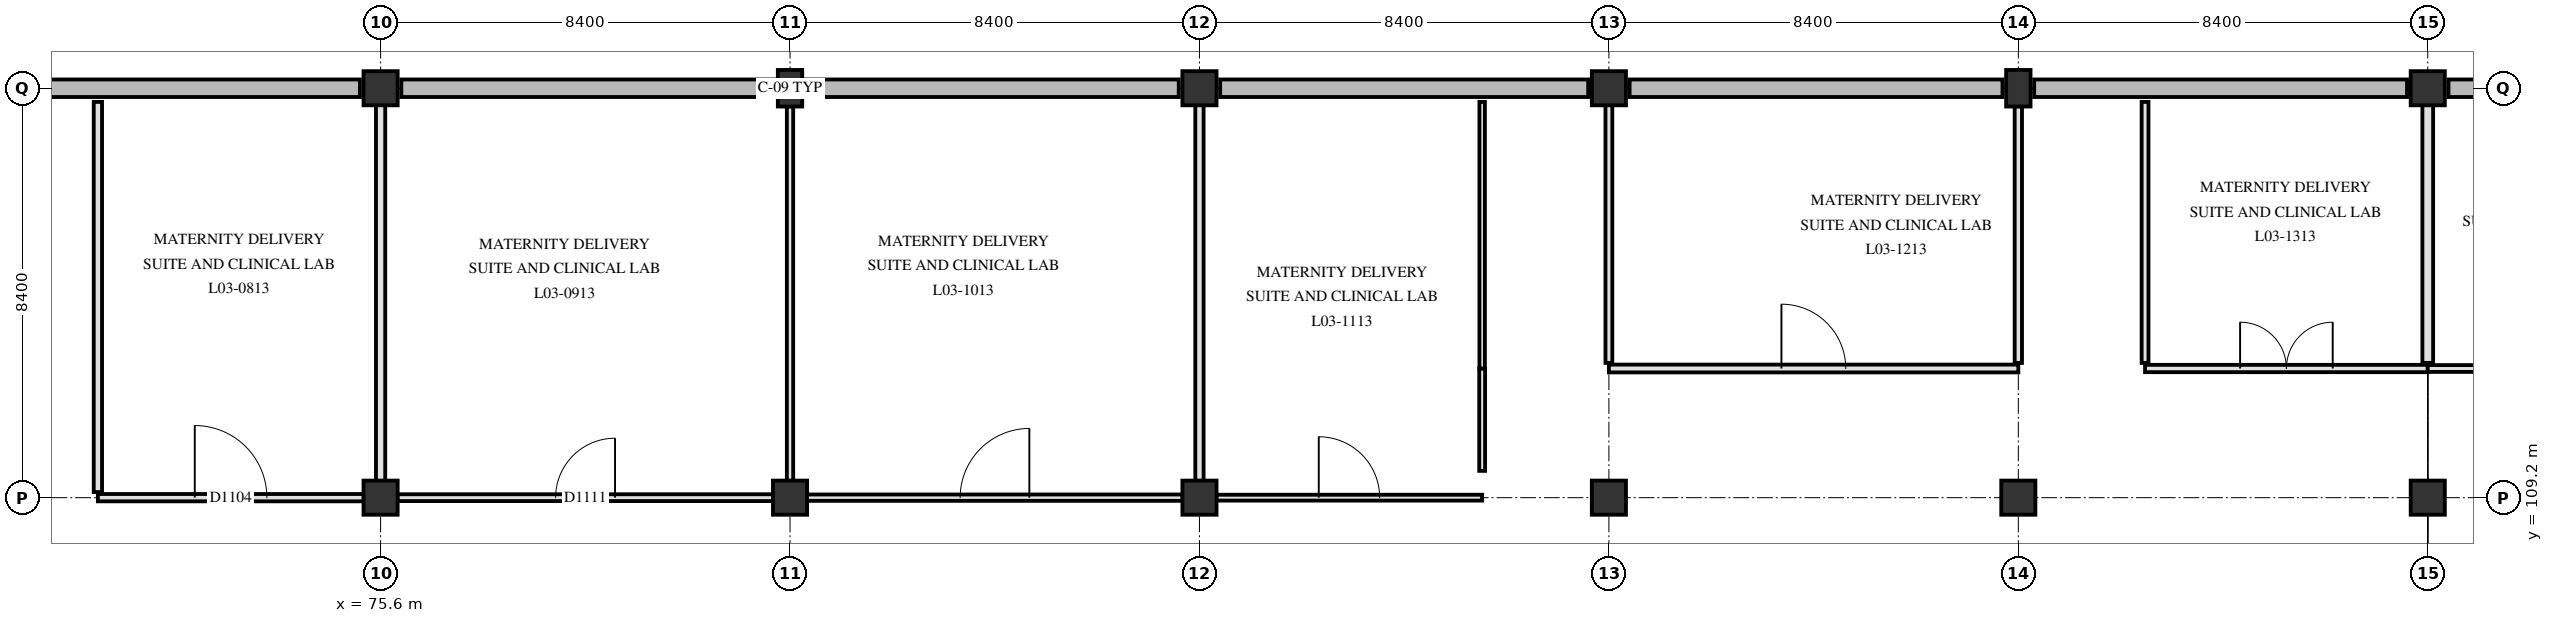
"""IFC4 building model, lengths in metres.
Left out: names, types, materials, properties, quantities, classifications, styles, units other than length and angle.
Written with IfcOpenShell. Run it as: python <this file> out.ifc"""

import sys

from ifc_helpers import new_model, si_unit, direction, frame, frame_2d, origin, origin_2d, place, context, subcontext, project, spatial, rectangle, extrude, element, fill, save


model = new_model("IFC4")
c1 = context("Model", 3, precision=1e-05, world=origin(), true_north=direction((0.0, 1.0)))
c2 = subcontext(c1, "Body", "Model", "MODEL_VIEW")
j1 = project(units=[si_unit("LENGTHUNIT", "METRE"), si_unit("PLANEANGLEUNIT", "RADIAN")], contexts=[c1])
p1 = place(None, origin())
s1 = spatial("IfcSite", under=j1, at=p1, CompositionType="ELEMENT")
p2 = place(p1, origin())
s2 = spatial("IfcBuilding", under=s1, at=p2, CompositionType="ELEMENT")
p3 = place(p2, frame((0.0, 0.0, 14.4)))
s3 = spatial("IfcBuildingStorey", under=s2, at=p3, CompositionType="ELEMENT", Elevation=14.4)
for number, where, z_axis, x_axis in (
    (1, (75.6, 109.2, 0.0), (0.0, 0.0, 1.0), (1.0, 0.0, 0.0)),
    (2, (75.6, 117.6, 0.0), (0.0, 0.0, 1.0), (1.0, 0.0, 0.0)),
    (3, (84.0, 109.2, 0.0), (0.0, 0.0, 1.0), (1.0, 0.0, 0.0)),
):
    element("IfcColumn", number, at=place(p3, frame(where, z_axis=z_axis, x_axis=x_axis)), inside=s3, PredefinedType="COLUMN", context=c2, shape_type="SweptSolid", body=[
        extrude(rectangle(XDim=0.7, YDim=0.7, at=origin_2d()), origin(), (0.0, 0.0, 1.0), 4.2),
    ])
p4 = place(p3, frame((84.0, 117.6, 0.0), z_axis=(0.0, 0.0, 1.0), x_axis=(1.0, 0.0, 0.0)))
e4 = element("IfcColumn", 4, at=p4, inside=s3, PredefinedType="PILASTER", context=c2, shape_type="SweptSolid", body=[
    extrude(rectangle(XDim=0.5, YDim=0.75, at=origin_2d()), origin(), (0.0, 0.0, 1.0), 4.2),
])
for number, where, z_axis, x_axis in (
    (5, (92.4, 109.2, 0.0), (0.0, 0.0, 1.0), (1.0, 0.0, 0.0)),
    (6, (92.4, 117.6, 0.0), (0.0, 0.0, 1.0), (1.0, 0.0, 0.0)),
    (7, (100.8, 109.2, 0.0), (0.0, 0.0, 1.0), (1.0, 0.0, 0.0)),
    (8, (100.8, 117.6, 0.0), (0.0, 0.0, 1.0), (1.0, 0.0, 0.0)),
    (9, (109.2, 109.2, 0.0), (0.0, 0.0, 1.0), (1.0, 0.0, 0.0)),
):
    element("IfcColumn", number, at=place(p3, frame(where, z_axis=z_axis, x_axis=x_axis)), inside=s3, PredefinedType="COLUMN", context=c2, shape_type="SweptSolid", body=[
        extrude(rectangle(XDim=0.7, YDim=0.7, at=origin_2d()), origin(), (0.0, 0.0, 1.0), 4.2),
    ])
p5 = place(p3, frame((109.2, 117.6, 0.0), z_axis=(0.0, 0.0, 1.0), x_axis=(1.0, 0.0, 0.0)))
e10 = element("IfcColumn", 10, at=p5, inside=s3, PredefinedType="PILASTER", context=c2, shape_type="SweptSolid", body=[
    extrude(rectangle(XDim=0.5, YDim=0.75, at=origin_2d()), origin(), (0.0, 0.0, 1.0), 4.2),
])
for number, where, z_axis, x_axis in (
    (11, (117.6, 109.2, 0.0), (0.0, 0.0, 1.0), (1.0, 0.0, 0.0)),
    (12, (117.6, 117.6, 0.0), (0.0, 0.0, 1.0), (1.0, 0.0, 0.0)),
):
    element("IfcColumn", number, at=place(p3, frame(where, z_axis=z_axis, x_axis=x_axis)), inside=s3, PredefinedType="COLUMN", context=c2, shape_type="SweptSolid", body=[
        extrude(rectangle(XDim=0.7, YDim=0.7, at=origin_2d()), origin(), (0.0, 0.0, 1.0), 4.2),
    ])
p6 = place(p3, frame((67.625, 117.6, 0.0), z_axis=(0.0, 0.0, 1.0), x_axis=(1.0, 0.0, 0.0)))
e13 = element("IfcWall", 13, at=p6, inside=s3, PredefinedType="SOLIDWALL", context=c2, shape_type="SweptSolid", body=[
    extrude(rectangle(XDim=7.55, YDim=0.36, at=frame_2d((3.775, 0.0))), origin(), (0.0, 0.0, 1.0), 3.9),
])
for number, where, z_axis, x_axis in (
    (14, (76.025, 117.6, 0.0), (0.0, 0.0, 1.0), (1.0, 0.0, 0.0)),
    (15, (84.325, 117.6, 0.0), (0.0, 0.0, 1.0), (1.0, 0.0, 0.0)),
):
    element("IfcWall", number, at=place(p3, frame(where, z_axis=z_axis, x_axis=x_axis)), inside=s3, PredefinedType="SOLIDWALL", context=c2, shape_type="SweptSolid", body=[
        extrude(rectangle(XDim=7.65, YDim=0.36, at=frame_2d((3.825, 0.0))), origin(), (0.0, 0.0, 1.0), 3.9),
    ])
p7 = place(p3, frame((92.825, 117.6, 0.0), z_axis=(0.0, 0.0, 1.0), x_axis=(1.0, 0.0, 0.0)))
e16 = element("IfcWall", 16, at=p7, inside=s3, PredefinedType="SOLIDWALL", context=c2, shape_type="SweptSolid", body=[
    extrude(rectangle(XDim=7.55, YDim=0.36, at=frame_2d((3.775, 0.0))), origin(), (0.0, 0.0, 1.0), 3.9),
])
p8 = place(p3, frame((101.225, 117.6, 0.0), z_axis=(0.0, 0.0, 1.0), x_axis=(1.0, 0.0, 0.0)))
e17 = element("IfcWall", 17, at=p8, inside=s3, PredefinedType="SOLIDWALL", context=c2, shape_type="SweptSolid", body=[
    extrude(rectangle(XDim=7.65, YDim=0.36, at=frame_2d((3.825, 0.0))), origin(), (0.0, 0.0, 1.0), 3.9),
])
p9 = place(p3, frame((109.525, 117.6, 0.0), z_axis=(0.0, 0.0, 1.0), x_axis=(1.0, 0.0, 0.0)))
e18 = element("IfcWall", 18, at=p9, inside=s3, PredefinedType="SOLIDWALL", context=c2, shape_type="SweptSolid", body=[
    extrude(rectangle(XDim=7.65, YDim=0.36, at=frame_2d((3.825, 0.0))), origin(), (0.0, 0.0, 1.0), 3.9),
])
p10 = place(p3, frame((118.025, 117.6, 0.0), z_axis=(0.0, 0.0, 1.0), x_axis=(1.0, 0.0, 0.0)))
e19 = element("IfcWall", 19, at=p10, inside=s3, PredefinedType="SOLIDWALL", context=c2, shape_type="SweptSolid", body=[
    extrude(rectangle(XDim=7.55, YDim=0.36, at=frame_2d((3.775, 0.0))), origin(), (0.0, 0.0, 1.0), 3.9),
])
p11 = place(p3, frame((69.8, 109.2, 0.0), z_axis=(0.0, 0.0, 1.0), x_axis=(1.0, 0.0, 0.0)))
e20 = element("IfcWall", 20, at=p11, inside=s3, PredefinedType="PARTITIONING", context=c2, shape_type="SweptSolid", body=[
    extrude(rectangle(XDim=5.455, YDim=0.15, at=frame_2d((2.728, 0.0))), origin(), (0.0, 0.0, 1.0), 3.29),
])
p12 = place(p11, frame((1.988, 0.0, 0.0)))
e21 = element("IfcOpeningElement", 21, at=p12, cuts=e20, PredefinedType="OPENING", context=c2, shape_type="SweptSolid", body=[
    extrude(rectangle(XDim=1.48, YDim=2.22, at=frame_2d((0.74, 1.11))), frame((0.0, 0.085, 0.0), z_axis=(0.0, -1.0, 0.0), x_axis=(1.0, 0.0, 0.0)), (0.0, 0.0, 1.0), 0.17),
])
p13 = place(p3, frame((75.945, 109.2, 0.0), z_axis=(0.0, 0.0, 1.0), x_axis=(1.0, 0.0, 0.0)))
e22 = element("IfcWall", 22, at=p13, inside=s3, PredefinedType="PARTITIONING", context=c2, shape_type="SweptSolid", body=[
    extrude(rectangle(XDim=7.71, YDim=0.14, at=frame_2d((3.855, 0.0))), origin(), (0.0, 0.0, 1.0), 3.29),
])
p14 = place(p13, frame((3.245, 0.0, 0.0)))
e23 = element("IfcOpeningElement", 23, at=p14, cuts=e22, PredefinedType="OPENING", context=c2, shape_type="SweptSolid", body=[
    extrude(rectangle(XDim=1.22, YDim=2.18, at=frame_2d((0.61, 1.09))), frame((0.0, 0.08, 0.0), z_axis=(0.0, -1.0, 0.0), x_axis=(1.0, 0.0, 0.0)), (0.0, 0.0, 1.0), 0.16),
])
p15 = place(p3, frame((84.345, 109.2, 0.0), z_axis=(0.0, 0.0, 1.0), x_axis=(1.0, 0.0, 0.0)))
e24 = element("IfcWall", 24, at=p15, inside=s3, PredefinedType="PARTITIONING", context=c2, shape_type="SweptSolid", body=[
    extrude(rectangle(XDim=7.71, YDim=0.13, at=frame_2d((3.855, 0.0))), origin(), (0.0, 0.0, 1.0), 3.29),
])
p16 = place(p15, frame((3.145, 0.0, 0.0)))
e25 = element("IfcOpeningElement", 25, at=p16, cuts=e24, PredefinedType="OPENING", context=c2, shape_type="SweptSolid", body=[
    extrude(rectangle(XDim=1.42, YDim=2.22, at=frame_2d((0.71, 1.11))), frame((0.0, 0.075, 0.0), z_axis=(0.0, -1.0, 0.0), x_axis=(1.0, 0.0, 0.0)), (0.0, 0.0, 1.0), 0.15),
])
p17 = place(p3, frame((92.745, 109.2, 0.0), z_axis=(0.0, 0.0, 1.0), x_axis=(1.0, 0.0, 0.0)))
e26 = element("IfcWall", 26, at=p17, inside=s3, PredefinedType="PARTITIONING", context=c2, shape_type="SweptSolid", body=[
    extrude(rectangle(XDim=5.455, YDim=0.12, at=frame_2d((2.728, 0.0))), origin(), (0.0, 0.0, 1.0), 3.29),
])
p18 = place(p17, frame((2.103, 0.0, 0.0)))
e27 = element("IfcOpeningElement", 27, at=p18, cuts=e26, PredefinedType="OPENING", context=c2, shape_type="SweptSolid", body=[
    extrude(rectangle(XDim=1.25, YDim=2.2, at=frame_2d((0.625, 1.1))), frame((0.0, 0.07, 0.0), z_axis=(0.0, -1.0, 0.0), x_axis=(1.0, 0.0, 0.0)), (0.0, 0.0, 1.0), 0.14),
])
p19 = place(p3, frame((100.8, 111.85, 0.0), z_axis=(0.0, 0.0, 1.0), x_axis=(1.0, 0.0, 0.0)))
e28 = element("IfcWall", 28, at=p19, inside=s3, PredefinedType="PARTITIONING", context=c2, shape_type="SweptSolid", body=[
    extrude(rectangle(XDim=8.4, YDim=0.16, at=frame_2d((4.2, 0.0))), origin(), (0.0, 0.0, 1.0), 2.69),
])
p20 = place(p19, frame((3.54, 0.0, 0.0)))
e29 = element("IfcOpeningElement", 29, at=p20, cuts=e28, PredefinedType="OPENING", context=c2, shape_type="SweptSolid", body=[
    extrude(rectangle(XDim=1.32, YDim=2.18, at=frame_2d((0.66, 1.09))), frame((0.0, 0.09, 0.0), z_axis=(0.0, -1.0, 0.0), x_axis=(1.0, 0.0, 0.0)), (0.0, 0.0, 1.0), 0.18),
])
p21 = place(p3, frame((111.8, 111.85, 0.0), z_axis=(0.0, 0.0, 1.0), x_axis=(1.0, 0.0, 0.0)))
e30 = element("IfcWall", 30, at=p21, inside=s3, PredefinedType="PARTITIONING", context=c2, shape_type="SweptSolid", body=[
    extrude(rectangle(XDim=5.8, YDim=0.15, at=frame_2d((2.9, 0.0))), origin(), (0.0, 0.0, 1.0), 3.34),
])
p22 = place(p21, frame((1.95, 0.0, 0.0)))
e31 = element("IfcOpeningElement", 31, at=p22, cuts=e30, PredefinedType="OPENING", context=c2, shape_type="SweptSolid", body=[
    extrude(rectangle(XDim=1.9, YDim=2.3, at=frame_2d((0.95, 1.15))), frame((0.0, 0.085, 0.0), z_axis=(0.0, -1.0, 0.0), x_axis=(1.0, 0.0, 0.0)), (0.0, 0.0, 1.0), 0.17),
])
p23 = place(p3, frame((117.6, 111.85, 0.0), z_axis=(0.0, 0.0, 1.0), x_axis=(1.0, 0.0, 0.0)))
e32 = element("IfcWall", 32, at=p23, inside=s3, PredefinedType="PARTITIONING", context=c2, shape_type="SweptSolid", body=[
    extrude(rectangle(XDim=8.4, YDim=0.14, at=frame_2d((4.2, 0.0))), origin(), (0.0, 0.0, 1.0), 2.69),
])
p24 = place(p23, frame((3.69, 0.0, 0.0)))
e33 = element("IfcOpeningElement", 33, at=p24, cuts=e32, PredefinedType="OPENING", context=c2, shape_type="SweptSolid", body=[
    extrude(rectangle(XDim=1.02, YDim=2.12, at=frame_2d((0.51, 1.06))), frame((0.0, 0.08, 0.0), z_axis=(0.0, -1.0, 0.0), x_axis=(1.0, 0.0, 0.0)), (0.0, 0.0, 1.0), 0.16),
])
p25 = place(p3, frame((69.8, 109.315, 0.0), z_axis=(0.0, 0.0, 1.0), x_axis=(0.0, 1.0, 0.0)))
e34 = element("IfcWall", 34, at=p25, inside=s3, PredefinedType="PARTITIONING", context=c2, shape_type="SweptSolid", body=[
    extrude(rectangle(XDim=8.005, YDim=0.17, at=frame_2d((4.002, 0.0))), origin(), (0.0, 0.0, 1.0), 2.89),
])
p26 = place(p3, frame((75.6, 109.545, 0.0), z_axis=(0.0, 0.0, 1.0), x_axis=(0.0, 1.0, 0.0)))
e35 = element("IfcWall", 35, at=p26, inside=s3, PredefinedType="PARTITIONING", context=c2, shape_type="SweptSolid", body=[
    extrude(rectangle(XDim=7.71, YDim=0.19, at=frame_2d((3.855, 0.0))), origin(), (0.0, 0.0, 1.0), 3.34),
])
p27 = place(p3, frame((84.0, 109.545, 0.0), z_axis=(0.0, 0.0, 1.0), x_axis=(0.0, 1.0, 0.0)))
e36 = element("IfcWall", 36, at=p27, inside=s3, PredefinedType="PARTITIONING", context=c2, shape_type="SweptSolid", body=[
    extrude(rectangle(XDim=7.685, YDim=0.13, at=frame_2d((3.843, 0.0))), origin(), (0.0, 0.0, 1.0), 3.34),
])
p28 = place(p3, frame((92.4, 109.545, 0.0), z_axis=(0.0, 0.0, 1.0), x_axis=(0.0, 1.0, 0.0)))
e37 = element("IfcWall", 37, at=p28, inside=s3, PredefinedType="PARTITIONING", context=c2, shape_type="SweptSolid", body=[
    extrude(rectangle(XDim=7.71, YDim=0.17, at=frame_2d((3.855, 0.0))), origin(), (0.0, 0.0, 1.0), 3.34),
])
p29 = place(p3, frame((98.2, 109.75, 0.0), z_axis=(0.0, 0.0, 1.0), x_axis=(0.0, 1.0, 0.0)))
e38 = element("IfcWall", 38, at=p29, inside=s3, PredefinedType="PARTITIONING", context=c2, shape_type="SweptSolid", body=[
    extrude(rectangle(XDim=2.1, YDim=0.12, at=frame_2d((1.05, 0.0))), origin(), (0.0, 0.0, 1.0), 3.89),
])
p30 = place(p3, frame((98.2, 111.85, 0.0), z_axis=(0.0, 0.0, 1.0), x_axis=(0.0, 1.0, 0.0)))
e39 = element("IfcWall", 39, at=p30, inside=s3, PredefinedType="PARTITIONING", context=c2, shape_type="SweptSolid", body=[
    extrude(rectangle(XDim=5.47, YDim=0.112, at=frame_2d((2.735, 0.0))), origin(), (0.0, 0.0, 1.0), 2.89),
])
p31 = place(p3, frame((100.8, 111.965, 0.0), z_axis=(0.0, 0.0, 1.0), x_axis=(0.0, 1.0, 0.0)))
e40 = element("IfcWall", 40, at=p31, inside=s3, PredefinedType="PARTITIONING", context=c2, shape_type="SweptSolid", body=[
    extrude(rectangle(XDim=5.29, YDim=0.14, at=frame_2d((2.645, 0.0))), origin(), (0.0, 0.0, 1.0), 2.69),
])
p32 = place(p3, frame((109.2, 111.965, 0.0), z_axis=(0.0, 0.0, 1.0), x_axis=(0.0, 1.0, 0.0)))
e41 = element("IfcWall", 41, at=p32, inside=s3, PredefinedType="PARTITIONING", context=c2, shape_type="SweptSolid", body=[
    extrude(rectangle(XDim=5.265, YDim=0.15, at=frame_2d((2.632, 0.0))), origin(), (0.0, 0.0, 1.0), 3.34),
])
p33 = place(p3, frame((111.8, 111.965, 0.0), z_axis=(0.0, 0.0, 1.0), x_axis=(0.0, 1.0, 0.0)))
e42 = element("IfcWall", 42, at=p33, inside=s3, PredefinedType="PARTITIONING", context=c2, shape_type="SweptSolid", body=[
    extrude(rectangle(XDim=5.355, YDim=0.14, at=frame_2d((2.677, 0.0))), origin(), (0.0, 0.0, 1.0), 2.89),
])
p34 = place(p3, frame((117.6, 111.965, 0.0), z_axis=(0.0, 0.0, 1.0), x_axis=(0.0, 1.0, 0.0)))
e43 = element("IfcWall", 43, at=p34, inside=s3, PredefinedType="PARTITIONING", context=c2, shape_type="SweptSolid", body=[
    extrude(rectangle(XDim=5.29, YDim=0.22, at=frame_2d((2.645, 0.0))), origin(), (0.0, 0.0, 1.0), 3.34),
])
p35 = place(p12, origin())
e44 = element("IfcDoor", 44, at=p35, inside=s3, OperationType="SINGLE_SWING_LEFT", PredefinedType="DOOR", context=c2, shape_type="SweptSolid", body=[
    extrude(rectangle(XDim=1.48, YDim=2.22, at=frame_2d((0.74, 1.11))), frame((0.0, 0.025, 0.0), z_axis=(0.0, -1.0, 0.0), x_axis=(1.0, 0.0, 0.0)), (0.0, 0.0, 1.0), 0.05),
])
fill(e21, e44)
p36 = place(p14, origin())
e45 = element("IfcDoor", 45, at=p36, inside=s3, OperationType="SINGLE_SWING_RIGHT", PredefinedType="DOOR", context=c2, shape_type="SweptSolid", body=[
    extrude(rectangle(XDim=1.22, YDim=2.18, at=frame_2d((0.61, 1.09))), frame((0.0, 0.025, 0.0), z_axis=(0.0, -1.0, 0.0), x_axis=(1.0, 0.0, 0.0)), (0.0, 0.0, 1.0), 0.05),
])
fill(e23, e45)
p37 = place(p16, origin())
e46 = element("IfcDoor", 46, at=p37, inside=s3, OperationType="SINGLE_SWING_RIGHT", PredefinedType="DOOR", context=c2, shape_type="SweptSolid", body=[
    extrude(rectangle(XDim=1.42, YDim=2.22, at=frame_2d((0.71, 1.11))), frame((0.0, 0.025, 0.0), z_axis=(0.0, -1.0, 0.0), x_axis=(1.0, 0.0, 0.0)), (0.0, 0.0, 1.0), 0.05),
])
fill(e25, e46)
p38 = place(p18, origin())
e47 = element("IfcDoor", 47, at=p38, inside=s3, OperationType="SINGLE_SWING_LEFT", PredefinedType="DOOR", context=c2, shape_type="SweptSolid", body=[
    extrude(rectangle(XDim=1.25, YDim=2.2, at=frame_2d((0.625, 1.1))), frame((0.0, 0.025, 0.0), z_axis=(0.0, -1.0, 0.0), x_axis=(1.0, 0.0, 0.0)), (0.0, 0.0, 1.0), 0.05),
])
fill(e27, e47)
p39 = place(p20, origin())
e48 = element("IfcDoor", 48, at=p39, inside=s3, OperationType="SINGLE_SWING_LEFT", PredefinedType="DOOR", context=c2, shape_type="SweptSolid", body=[
    extrude(rectangle(XDim=1.32, YDim=2.18, at=frame_2d((0.66, 1.09))), frame((0.0, 0.025, 0.0), z_axis=(0.0, -1.0, 0.0), x_axis=(1.0, 0.0, 0.0)), (0.0, 0.0, 1.0), 0.05),
])
fill(e29, e48)
p40 = place(p22, origin())
e49 = element("IfcDoor", 49, at=p40, inside=s3, OperationType="DOUBLE_SWING_LEFT", PredefinedType="DOOR", context=c2, shape_type="SweptSolid", body=[
    extrude(rectangle(XDim=1.9, YDim=2.3, at=frame_2d((0.95, 1.15))), frame((0.0, 0.025, 0.0), z_axis=(0.0, -1.0, 0.0), x_axis=(1.0, 0.0, 0.0)), (0.0, 0.0, 1.0), 0.05),
])
fill(e31, e49)
save(model, sys.argv[1])
